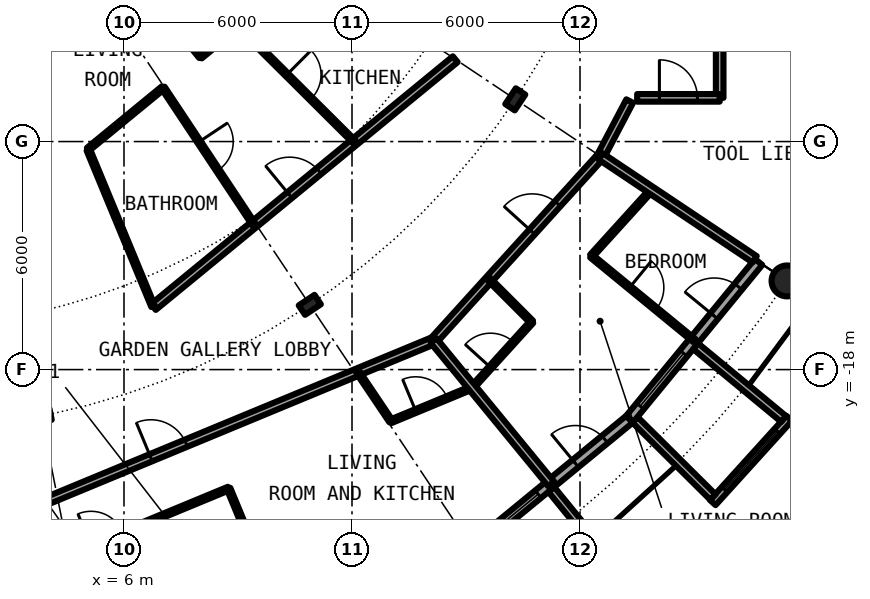
"""IFC4 building model, lengths in metres.
Left out: names, types, materials, properties, quantities, classifications, styles, units other than length and angle.
Written with IfcOpenShell. Run it as: python <this file> out.ifc"""

import sys

from ifc_helpers import new_model, si_unit, direction, frame, frame_2d, origin, origin_2d, place, context, subcontext, project, spatial, rectangle, circle, hollow_circle, i_section, extrude, element, fill, save


model = new_model("IFC4")
c1 = context("Model", 3, precision=1e-05, world=origin(), true_north=direction((0.0, 1.0)))
c2 = subcontext(c1, "Body", "Model", "MODEL_VIEW")
j1 = project(units=[si_unit("LENGTHUNIT", "METRE"), si_unit("PLANEANGLEUNIT", "RADIAN")], contexts=[c1])
p1 = place(None, origin())
s1 = spatial("IfcSite", under=j1, at=p1, CompositionType="ELEMENT")
p2 = place(p1, origin())
s2 = spatial("IfcBuilding", under=s1, at=p2, CompositionType="ELEMENT")
p3 = place(p2, frame((0.0, 0.0, 145.2)))
s3 = spatial("IfcBuildingStorey", under=s2, at=p3, CompositionType="ELEMENT", Elevation=145.2)
p4 = place(p3, frame((23.448, -15.667, 0.0), z_axis=(0.0, 0.0, 1.0), x_axis=(1.0, 0.0, 0.0)))
e1 = element("IfcColumn", 1, at=p4, inside=s3, PredefinedType="COLUMN", context=c2, shape_type="SweptSolid", body=[
    extrude(hollow_circle(Radius=0.406, WallThickness=0.04, at=origin_2d()), origin(), (0.0, 0.0, 1.0), 3.05),
])
for number, where, z_axis, x_axis in (
    (2, (10.889, -16.297, 0.0), (0.0, 0.0, 1.0), (0.556, -0.831, 0.0)),
    (3, (16.297, -10.889, 0.0), (0.0, 0.0, 1.0), (0.831, -0.556, 0.0)),
):
    element("IfcColumn", number, at=place(p3, frame(where, z_axis=z_axis, x_axis=x_axis)), inside=s3, PredefinedType="COLUMN", context=c2, shape_type="SweptSolid", body=[
        extrude(i_section(OverallWidth=0.3, OverallDepth=0.5, WebThickness=0.014, FlangeThickness=0.028, FilletRadius=0.027, at=origin_2d()), origin(), (0.0, 0.0, 1.0), 3.05),
    ])
p5 = place(p3, frame((15.167, -22.699, 0.0), z_axis=(0.0, 0.0, 1.0), x_axis=(0.773019449054, 0.634382322723, 0.0)))
e4 = element("IfcWall", 4, at=p5, inside=s3, PredefinedType="SOLIDWALL", context=c2, shape_type="SweptSolid", body=[
    extrude(rectangle(XDim=5.352, YDim=0.25, at=frame_2d((2.676, 0.0))), origin(), (0.0, 0.0, 1.0), 2.7),
])
p6 = place(p5, frame((0.441, 0.0, 0.3)))
e5 = element("IfcOpeningElement", 5, at=p6, cuts=e4, PredefinedType="OPENING", context=c2, shape_type="SweptSolid", body=[
    extrude(rectangle(XDim=1.8, YDim=2.1, at=frame_2d((0.9, 1.05))), frame((0.0, 0.135, 0.0), z_axis=(0.0, -1.0, 0.0), x_axis=(1.0, 0.0, 0.0)), (0.0, 0.0, 1.0), 0.27),
])
p7 = place(p5, frame((3.51, 0.0, 0.0)))
e6 = element("IfcOpeningElement", 6, at=p7, cuts=e4, PredefinedType="OPENING", context=c2, shape_type="SweptSolid", body=[
    extrude(rectangle(XDim=1.0, YDim=2.2, at=frame_2d((0.5, 1.1))), frame((0.0, 0.135, 0.0), z_axis=(0.0, -1.0, 0.0), x_axis=(1.0, 0.0, 0.0)), (0.0, 0.0, 1.0), 0.27),
])
p8 = place(p3, frame((17.246, -21.155, -0.03), z_axis=(0.0, 0.0, 1.0), x_axis=(0.631741648902, -0.775179004516, 0.0)))
e7 = element("IfcWall", 7, at=p8, inside=s3, PredefinedType="SOLIDWALL", context=c2, shape_type="SweptSolid", body=[
    extrude(rectangle(XDim=3.006, YDim=0.2, at=frame_2d((1.503, 0.0))), origin(), (0.0, 0.0, 1.0), 2.73),
])
p9 = place(p3, frame((19.304, -19.304, 0.0), z_axis=(0.0, 0.0, 1.0), x_axis=(0.634382322723, 0.773019449054, 0.0)))
e8 = element("IfcWall", 8, at=p9, inside=s3, PredefinedType="SOLIDWALL", context=c2, shape_type="SweptSolid", body=[
    extrude(rectangle(XDim=5.352, YDim=0.25, at=frame_2d((2.676, 0.0))), origin(), (0.0, 0.0, 1.0), 2.7),
])
p10 = place(p9, frame((0.441, 0.0, 0.3)))
e9 = element("IfcOpeningElement", 9, at=p10, cuts=e8, PredefinedType="OPENING", context=c2, shape_type="SweptSolid", body=[
    extrude(rectangle(XDim=1.8, YDim=2.1, at=frame_2d((0.9, 1.05))), frame((0.0, 0.135, 0.0), z_axis=(0.0, -1.0, 0.0), x_axis=(1.0, 0.0, 0.0)), (0.0, 0.0, 1.0), 0.27),
])
p11 = place(p9, frame((3.51, 0.0, 0.0)))
e10 = element("IfcOpeningElement", 10, at=p11, cuts=e8, PredefinedType="OPENING", context=c2, shape_type="SweptSolid", body=[
    extrude(rectangle(XDim=1.0, YDim=2.2, at=frame_2d((0.5, 1.1))), frame((0.0, 0.135, 0.0), z_axis=(0.0, -1.0, 0.0), x_axis=(1.0, 0.0, 0.0)), (0.0, 0.0, 1.0), 0.27),
])
p12 = place(p3, frame((21.493, -21.5, -0.03), z_axis=(0.0, 0.0, 1.0), x_axis=(0.671506829416, 0.740998365753, 0.0)))
e11 = element("IfcWall", 11, at=p12, inside=s3, PredefinedType="SOLIDWALL", context=c2, shape_type="SweptSolid", body=[
    extrude(rectangle(XDim=2.993, YDim=0.2, at=frame_2d((1.497, 0.0))), origin(), (0.0, 0.0, 1.0), 2.73),
])
p13 = place(p12, frame((0.457, 0.0, 0.33)))
e12 = element("IfcOpeningElement", 12, at=p13, cuts=e11, PredefinedType="OPENING", context=c2, shape_type="SweptSolid", body=[
    extrude(circle(Radius=1.04, at=frame_2d((1.04, 1.04))), frame((0.0, 0.11, 0.0), z_axis=(0.0, -1.0, 0.0), x_axis=(1.0, 0.0, 0.0)), (0.0, 0.0, 1.0), 0.22),
])
p14 = place(p3, frame((19.45, -19.323, -0.03), z_axis=(0.0, 0.0, 1.0), x_axis=(0.709727076896, -0.704476739375, 0.0)))
e13 = element("IfcWall", 13, at=p14, inside=s3, PredefinedType="SOLIDWALL", context=c2, shape_type="SweptSolid", body=[
    extrude(rectangle(XDim=2.883, YDim=0.2, at=frame_2d((1.441, 0.0))), origin(), (0.0, 0.0, 1.0), 2.73),
])
p15 = place(p3, frame((21.041, -17.384, -0.03), z_axis=(0.0, 0.0, 1.0), x_axis=(0.770784861449, -0.63709551667, 0.0)))
e14 = element("IfcWall", 14, at=p15, inside=s3, PredefinedType="SOLIDWALL", context=c2, shape_type="SweptSolid", body=[
    extrude(rectangle(XDim=3.006, YDim=0.2, at=frame_2d((1.503, 0.0))), origin(), (0.0, 0.0, 1.0), 2.73),
])
p16 = place(p3, frame((15.162, -18.475, 0.0), z_axis=(0.0, 0.0, 1.0), x_axis=(0.671528384412, 0.740978831634, 0.0)))
e15 = element("IfcWall", 15, at=p16, inside=s3, PredefinedType="PARTITIONING", context=c2, shape_type="SweptSolid", body=[
    extrude(rectangle(XDim=2.338, YDim=0.1, at=frame_2d((1.169, 0.0))), origin(), (0.0, 0.0, 1.0), 2.7),
])
p17 = place(p16, frame((0.719, 0.0, 0.0)))
e16 = element("IfcOpeningElement", 16, at=p17, cuts=e15, PredefinedType="OPENING", context=c2, shape_type="SweptSolid", body=[
    extrude(rectangle(XDim=0.9, YDim=2.3, at=frame_2d((0.45, 1.15))), frame((0.0, 0.06, 0.0), z_axis=(0.0, -1.0, 0.0), x_axis=(1.0, 0.0, 0.0)), (0.0, 0.0, 1.0), 0.12),
])
p18 = place(p3, frame((18.302, -15.01, 0.0), z_axis=(0.0, 0.0, 1.0), x_axis=(0.671637685376, 0.740879760544, 0.0)))
e17 = element("IfcWall", 17, at=p18, inside=s3, PredefinedType="PARTITIONING", context=c2, shape_type="SweptSolid", body=[
    extrude(rectangle(XDim=2.338, YDim=0.1, at=frame_2d((1.169, 0.0))), origin(), (0.0, 0.0, 1.0), 2.7),
])
p19 = place(p3, frame((2.342, -23.785, 0.0), z_axis=(0.0, 0.0, 1.0), x_axis=(0.92388173557, 0.382678113667, 0.0)))
e18 = element("IfcWall", 18, at=p19, inside=s3, PredefinedType="PARTITIONING", context=c2, shape_type="SweptSolid", body=[
    extrude(rectangle(XDim=6.938, YDim=0.1, at=frame_2d((3.469, 0.0))), origin(), (0.0, 0.0, 1.0), 2.7),
])
p20 = place(p19, frame((3.021, 0.0, 0.0)))
e19 = element("IfcOpeningElement", 19, at=p20, cuts=e18, PredefinedType="OPENING", context=c2, shape_type="SweptSolid", body=[
    extrude(rectangle(XDim=0.9, YDim=2.3, at=frame_2d((0.45, 1.15))), frame((0.0, 0.06, 0.0), z_axis=(0.0, -1.0, 0.0), x_axis=(1.0, 0.0, 0.0)), (0.0, 0.0, 1.0), 0.12),
])
p21 = place(p19, frame((0.707, 0.0, 0.0)))
e20 = element("IfcOpeningElement", 20, at=p21, cuts=e18, PredefinedType="OPENING", context=c2, shape_type="SweptSolid", body=[
    extrude(rectangle(XDim=0.9, YDim=2.3, at=frame_2d((0.45, 1.15))), frame((0.0, 0.06, 0.0), z_axis=(0.0, -1.0, 0.0), x_axis=(1.0, 0.0, 0.0)), (0.0, 0.0, 1.0), 0.12),
])
p22 = place(p3, frame((13.028, -19.359, 0.0), z_axis=(0.0, 0.0, 1.0), x_axis=(0.92369108554, 0.383138067142, 0.0)))
e21 = element("IfcWall", 21, at=p22, inside=s3, PredefinedType="PARTITIONING", context=c2, shape_type="SweptSolid", body=[
    extrude(rectangle(XDim=2.312, YDim=0.1, at=frame_2d((1.156, 0.0))), origin(), (0.0, 0.0, 1.0), 2.7),
])
p23 = place(p22, frame((0.703, 0.0, 0.0)))
e22 = element("IfcOpeningElement", 22, at=p23, cuts=e21, PredefinedType="OPENING", context=c2, shape_type="SweptSolid", body=[
    extrude(rectangle(XDim=0.9, YDim=2.3, at=frame_2d((0.45, 1.15))), frame((0.0, 0.06, 0.0), z_axis=(0.0, -1.0, 0.0), x_axis=(1.0, 0.0, 0.0)), (0.0, 0.0, 1.0), 0.12),
])
p24 = place(p3, frame((18.542, -12.389, 0.0), z_axis=(0.0, 0.0, 1.0), x_axis=(0.465605550524, 0.884992356646, 0.0)))
e23 = element("IfcWall", 23, at=p24, inside=s3, PredefinedType="PARTITIONING", context=c2, shape_type="SweptSolid", body=[
    extrude(rectangle(XDim=1.643, YDim=0.2, at=frame_2d((0.821, 0.0))), origin(), (0.0, 0.0, 1.0), 2.7),
])
p25 = place(p3, frame((14.147, -17.238, 0.0), z_axis=(0.0, 0.0, 1.0), x_axis=(0.671561669125, 0.740948665268, 0.0)))
e24 = element("IfcWall", 24, at=p25, inside=s3, PredefinedType="PARTITIONING", context=c2, shape_type="SweptSolid", body=[
    extrude(rectangle(XDim=6.544, YDim=0.2, at=frame_2d((3.272, 0.0))), origin(), (0.0, 0.0, 1.0), 2.7),
])
p26 = place(p25, frame((3.862, 0.0, 0.0)))
e25 = element("IfcOpeningElement", 25, at=p26, cuts=e24, PredefinedType="OPENING", context=c2, shape_type="SweptSolid", body=[
    extrude(rectangle(XDim=1.0, YDim=2.3, at=frame_2d((0.5, 1.15))), frame((0.0, 0.11, 0.0), z_axis=(0.0, -1.0, 0.0), x_axis=(1.0, 0.0, 0.0)), (0.0, 0.0, 1.0), 0.22),
])
p27 = place(p3, frame((21.675, -10.85, 0.0), z_axis=(0.0, 0.0, 1.0), x_axis=(0.0, 1.0, 0.0)))
e26 = element("IfcWall", 26, at=p27, inside=s3, PredefinedType="PARTITIONING", context=c2, shape_type="SweptSolid", body=[
    extrude(rectangle(XDim=1.75, YDim=0.2, at=frame_2d((0.875, 0.0))), origin(), (0.0, 0.0, 1.0), 2.7),
])
p28 = place(p3, frame((2.186, -22.193, 0.0), z_axis=(0.0, 0.0, 1.0), x_axis=(0.923860535822, 0.382729291212, 0.0)))
e27 = element("IfcWall", 27, at=p28, inside=s3, PredefinedType="PARTITIONING", context=c2, shape_type="SweptSolid", body=[
    extrude(rectangle(XDim=12.947, YDim=0.2, at=frame_2d((6.473, 0.0))), origin(), (0.0, 0.0, 1.0), 2.7),
])
p29 = place(p28, frame((4.894, 0.0, 0.0)))
e28 = element("IfcOpeningElement", 28, at=p29, cuts=e27, PredefinedType="OPENING", context=c2, shape_type="SweptSolid", body=[
    extrude(rectangle(XDim=1.0, YDim=2.3, at=frame_2d((0.5, 1.15))), frame((0.0, 0.11, 0.0), z_axis=(0.0, -1.0, 0.0), x_axis=(1.0, 0.0, 0.0)), (0.0, 0.0, 1.0), 0.22),
])
p30 = place(p3, frame((6.773, -16.353, 0.0), z_axis=(0.0, 0.0, 1.0), x_axis=(0.773034536097, 0.634363938131, 0.0)))
e29 = element("IfcWall", 29, at=p30, inside=s3, PredefinedType="PARTITIONING", context=c2, shape_type="SweptSolid", body=[
    extrude(rectangle(XDim=10.277, YDim=0.2, at=frame_2d((5.138, 0.0))), origin(), (0.0, 0.0, 1.0), 2.7),
])
p31 = place(p30, frame((4.638, 0.0, 0.0)))
e30 = element("IfcOpeningElement", 30, at=p31, cuts=e29, PredefinedType="OPENING", context=c2, shape_type="SweptSolid", body=[
    extrude(rectangle(XDim=1.0, YDim=2.3, at=frame_2d((0.5, 1.15))), frame((0.0, 0.11, 0.0), z_axis=(0.0, -1.0, 0.0), x_axis=(1.0, 0.0, 0.0)), (0.0, 0.0, 1.0), 0.22),
])
p32 = place(p3, frame((5.055, -12.204, 0.0), z_axis=(0.0, 0.0, 1.0), x_axis=(0.772943675046, 0.634474645046, 0.0)))
e31 = element("IfcWall", 31, at=p32, inside=s3, PredefinedType="PARTITIONING", context=c2, shape_type="SweptSolid", body=[
    extrude(rectangle(XDim=2.557, YDim=0.1, at=frame_2d((1.278, 0.0))), origin(), (0.0, 0.0, 1.0), 2.7),
])
p33 = place(p3, frame((8.016, -9.773, 0.0), z_axis=(0.0, 0.0, 1.0), x_axis=(0.7731800648, 0.634186555673, 0.0)))
e32 = element("IfcWall", 32, at=p33, inside=s3, PredefinedType="PARTITIONING", context=c2, shape_type="SweptSolid", body=[
    extrude(rectangle(XDim=1.064, YDim=0.1, at=frame_2d((0.532, 0.0))), origin(), (0.0, 0.0, 1.0), 2.7),
])
p34 = place(p3, frame((19.504, -10.85, 0.0), z_axis=(0.0, 0.0, 1.0), x_axis=(1.0, 0.0, 0.0)))
e33 = element("IfcWall", 33, at=p34, inside=s3, PredefinedType="PARTITIONING", context=c2, shape_type="SweptSolid", body=[
    extrude(rectangle(XDim=2.171, YDim=0.2, at=frame_2d((1.085, 0.0))), origin(), (0.0, 0.0, 1.0), 2.7),
])
p35 = place(p34, frame((0.585, 0.0, 0.0)))
e34 = element("IfcOpeningElement", 34, at=p35, cuts=e33, PredefinedType="OPENING", context=c2, shape_type="SweptSolid", body=[
    extrude(rectangle(XDim=1.0, YDim=2.3, at=frame_2d((0.5, 1.15))), frame((0.0, 0.11, 0.0), z_axis=(0.0, -1.0, 0.0), x_axis=(1.0, 0.0, 0.0)), (0.0, 0.0, 1.0), 0.22),
])
p36 = place(p3, frame((4.898, -5.968, 0.0), z_axis=(0.0, 0.0, 1.0), x_axis=(0.634401778971, -0.773003481776, 0.0)))
e35 = element("IfcWall", 35, at=p36, inside=s3, PredefinedType="PARTITIONING", context=c2, shape_type="SweptSolid", body=[
    extrude(rectangle(XDim=4.92, YDim=0.1, at=frame_2d((2.46, 0.0))), origin(), (0.0, 0.0, 1.0), 2.7),
])
p37 = place(p36, frame((2.01, 0.0, 0.0)))
e36 = element("IfcOpeningElement", 36, at=p37, cuts=e35, PredefinedType="OPENING", context=c2, shape_type="SweptSolid", body=[
    extrude(rectangle(XDim=0.9, YDim=2.3, at=frame_2d((0.45, 1.15))), frame((0.0, 0.06, 0.0), z_axis=(0.0, -1.0, 0.0), x_axis=(1.0, 0.0, 0.0)), (0.0, 0.0, 1.0), 0.12),
])
p38 = place(p3, frame((7.028, -10.584, 0.0), z_axis=(0.0, 0.0, 1.0), x_axis=(0.553303732327, -0.832979579457, 0.0)))
e37 = element("IfcWall", 37, at=p38, inside=s3, PredefinedType="PARTITIONING", context=c2, shape_type="SweptSolid", body=[
    extrude(rectangle(XDim=4.319, YDim=0.1, at=frame_2d((2.16, 0.0))), origin(), (0.0, 0.0, 1.0), 2.7),
])
p39 = place(p38, frame((1.71, 0.0, 0.0)))
e38 = element("IfcOpeningElement", 38, at=p39, cuts=e37, PredefinedType="OPENING", context=c2, shape_type="SweptSolid", body=[
    extrude(rectangle(XDim=0.9, YDim=2.3, at=frame_2d((0.45, 1.15))), frame((0.0, 0.06, 0.0), z_axis=(0.0, -1.0, 0.0), x_axis=(1.0, 0.0, 0.0)), (0.0, 0.0, 1.0), 0.12),
])
p40 = place(p3, frame((8.752, -21.13, 0.0), z_axis=(0.0, 0.0, 1.0), x_axis=(0.382689142274, -0.923877167369, 0.0)))
e39 = element("IfcWall", 39, at=p40, inside=s3, PredefinedType="PARTITIONING", context=c2, shape_type="SweptSolid", body=[
    extrude(rectangle(XDim=4.304, YDim=0.1, at=frame_2d((2.152, 0.0))), origin(), (0.0, 0.0, 1.0), 2.7),
])
p41 = place(p40, frame((1.702, 0.0, 0.0)))
e40 = element("IfcOpeningElement", 40, at=p41, cuts=e39, PredefinedType="OPENING", context=c2, shape_type="SweptSolid", body=[
    extrude(rectangle(XDim=0.9, YDim=2.3, at=frame_2d((0.45, 1.15))), frame((0.0, 0.06, 0.0), z_axis=(0.0, -1.0, 0.0), x_axis=(1.0, 0.0, 0.0)), (0.0, 0.0, 1.0), 0.12),
])
p42 = place(p3, frame((9.144, -9.104, 0.0), z_axis=(0.0, 0.0, 1.0), x_axis=(0.708793214553, -0.705416316088, 0.0)))
e41 = element("IfcWall", 41, at=p42, inside=s3, PredefinedType="PARTITIONING", context=c2, shape_type="SweptSolid", body=[
    extrude(rectangle(XDim=4.121, YDim=0.1, at=frame_2d((2.061, 0.0))), origin(), (0.0, 0.0, 1.0), 2.7),
])
p43 = place(p42, frame((1.611, 0.0, 0.0)))
e42 = element("IfcOpeningElement", 42, at=p43, cuts=e41, PredefinedType="OPENING", context=c2, shape_type="SweptSolid", body=[
    extrude(rectangle(XDim=0.9, YDim=2.3, at=frame_2d((0.45, 1.15))), frame((0.0, 0.06, 0.0), z_axis=(0.0, -1.0, 0.0), x_axis=(1.0, 0.0, 0.0)), (0.0, 0.0, 1.0), 0.12),
])
p44 = place(p3, frame((12.153, -18.064, 0.0), z_axis=(0.0, 0.0, 1.0), x_axis=(0.558121913892, -0.829758958514, 0.0)))
e43 = element("IfcWall", 43, at=p44, inside=s3, PredefinedType="PARTITIONING", context=c2, shape_type="SweptSolid", body=[
    extrude(rectangle(XDim=1.562, YDim=0.1, at=frame_2d((0.781, 0.0))), origin(), (0.0, 0.0, 1.0), 2.7),
])
p45 = place(p3, frame((14.147, -17.238, 0.0), z_axis=(0.0, 0.0, 1.0), x_axis=(0.634374159378, -0.773026148273, 0.0)))
e44 = element("IfcWall", 44, at=p45, inside=s3, PredefinedType="PARTITIONING", context=c2, shape_type="SweptSolid", body=[
    extrude(rectangle(XDim=4.876, YDim=0.2, at=frame_2d((2.438, 0.0))), origin(), (0.0, 0.0, 1.0), 2.7),
])
p46 = place(p3, frame((15.608, -15.626, 0.0), z_axis=(0.0, 0.0, 1.0), x_axis=(0.70679860656, -0.707414821561, 0.0)))
e45 = element("IfcWall", 45, at=p46, inside=s3, PredefinedType="PARTITIONING", context=c2, shape_type="SweptSolid", body=[
    extrude(rectangle(XDim=1.585, YDim=0.1, at=frame_2d((0.792, 0.0))), origin(), (0.0, 0.0, 1.0), 2.7),
])
p47 = place(p3, frame((18.299, -15.014, 0.0), z_axis=(0.0, 0.0, 1.0), x_axis=(0.773131168403, -0.634246163917, 0.0)))
e46 = element("IfcWall", 46, at=p47, inside=s3, PredefinedType="PARTITIONING", context=c2, shape_type="SweptSolid", body=[
    extrude(rectangle(XDim=3.505, YDim=0.1, at=frame_2d((1.752, 0.0))), origin(), (0.0, 0.0, 1.0), 2.7),
])
p48 = place(p47, frame((1.302, 0.0, 0.0)))
e47 = element("IfcOpeningElement", 47, at=p48, cuts=e46, PredefinedType="OPENING", context=c2, shape_type="SweptSolid", body=[
    extrude(rectangle(XDim=0.9, YDim=2.3, at=frame_2d((0.45, 1.15))), frame((0.0, 0.06, 0.0), z_axis=(0.0, -1.0, 0.0), x_axis=(1.0, 0.0, 0.0)), (0.0, 0.0, 1.0), 0.12),
])
p49 = place(p3, frame((18.542, -12.389, 0.0), z_axis=(0.0, 0.0, 1.0), x_axis=(0.831387096605, -0.55569370664, 0.0)))
e48 = element("IfcWall", 48, at=p49, inside=s3, PredefinedType="PARTITIONING", context=c2, shape_type="SweptSolid", body=[
    extrude(rectangle(XDim=4.875, YDim=0.2, at=frame_2d((2.438, 0.0))), origin(), (0.0, 0.0, 1.0), 2.7),
])
p50 = place(p3, frame((6.765, -16.334, 0.0), z_axis=(0.0, 0.0, 1.0), x_axis=(-0.382498794932, 0.923955990226, 0.0)))
e49 = element("IfcWall", 49, at=p50, inside=s3, PredefinedType="PARTITIONING", context=c2, shape_type="SweptSolid", body=[
    extrude(rectangle(XDim=4.449, YDim=0.1, at=frame_2d((2.225, 0.0))), origin(), (0.0, 0.0, 1.0), 2.7),
])
p51 = place(p6, origin())
e50 = element("IfcWindow", 50, at=p51, inside=s3, PartitioningType="SINGLE_PANEL", PredefinedType="WINDOW", context=c2, shape_type="SweptSolid", body=[
    extrude(rectangle(XDim=1.8, YDim=2.1, at=frame_2d((0.9, 1.05))), frame((0.0, 0.03, 0.0), z_axis=(0.0, -1.0, 0.0), x_axis=(1.0, 0.0, 0.0)), (0.0, 0.0, 1.0), 0.06),
])
fill(e5, e50)
p52 = place(p7, origin())
e51 = element("IfcDoor", 51, at=p52, inside=s3, OperationType="SINGLE_SWING_LEFT", PredefinedType="DOOR", context=c2, shape_type="SweptSolid", body=[
    extrude(rectangle(XDim=1.0, YDim=2.2, at=frame_2d((0.5, 1.1))), frame((0.0, 0.025, 0.0), z_axis=(0.0, -1.0, 0.0), x_axis=(1.0, 0.0, 0.0)), (0.0, 0.0, 1.0), 0.05),
])
fill(e6, e51)
p53 = place(p10, origin())
e52 = element("IfcWindow", 52, at=p53, inside=s3, PartitioningType="SINGLE_PANEL", PredefinedType="WINDOW", context=c2, shape_type="SweptSolid", body=[
    extrude(rectangle(XDim=1.8, YDim=2.1, at=frame_2d((0.9, 1.05))), frame((0.0, 0.03, 0.0), z_axis=(0.0, -1.0, 0.0), x_axis=(1.0, 0.0, 0.0)), (0.0, 0.0, 1.0), 0.06),
])
fill(e9, e52)
p54 = place(p13, origin())
e53 = element("IfcWindow", 53, at=p54, inside=s3, PartitioningType="SINGLE_PANEL", PredefinedType="WINDOW", context=c2, shape_type="SweptSolid", body=[
    extrude(circle(Radius=1.04, at=frame_2d((1.04, 1.04))), frame((0.0, 0.03, 0.0), z_axis=(0.0, -1.0, 0.0), x_axis=(1.0, 0.0, 0.0)), (0.0, 0.0, 1.0), 0.06),
])
fill(e12, e53)
p55 = place(p11, origin())
e54 = element("IfcDoor", 54, at=p55, inside=s3, OperationType="SINGLE_SWING_LEFT", PredefinedType="DOOR", context=c2, shape_type="SweptSolid", body=[
    extrude(rectangle(XDim=1.0, YDim=2.2, at=frame_2d((0.5, 1.1))), frame((0.0, 0.025, 0.0), z_axis=(0.0, -1.0, 0.0), x_axis=(1.0, 0.0, 0.0)), (0.0, 0.0, 1.0), 0.05),
])
fill(e10, e54)
p56 = place(p29, origin())
e55 = element("IfcDoor", 55, at=p56, inside=s3, OperationType="SINGLE_SWING_LEFT", PredefinedType="DOOR", context=c2, shape_type="SweptSolid", body=[
    extrude(rectangle(XDim=1.0, YDim=2.3, at=frame_2d((0.5, 1.15))), frame((0.0, 0.025, 0.0), z_axis=(0.0, -1.0, 0.0), x_axis=(1.0, 0.0, 0.0)), (0.0, 0.0, 1.0), 0.05),
])
fill(e28, e55)
p57 = place(p23, origin())
e56 = element("IfcDoor", 56, at=p57, inside=s3, OperationType="SINGLE_SWING_LEFT", PredefinedType="DOOR", context=c2, shape_type="SweptSolid", body=[
    extrude(rectangle(XDim=0.9, YDim=2.3, at=frame_2d((0.45, 1.15))), frame((0.0, 0.025, 0.0), z_axis=(0.0, -1.0, 0.0), x_axis=(1.0, 0.0, 0.0)), (0.0, 0.0, 1.0), 0.05),
])
fill(e22, e56)
p58 = place(p26, origin())
e57 = element("IfcDoor", 57, at=p58, inside=s3, OperationType="SINGLE_SWING_RIGHT", PredefinedType="DOOR", context=c2, shape_type="SweptSolid", body=[
    extrude(rectangle(XDim=1.0, YDim=2.3, at=frame_2d((0.5, 1.15))), frame((0.0, 0.025, 0.0), z_axis=(0.0, -1.0, 0.0), x_axis=(1.0, 0.0, 0.0)), (0.0, 0.0, 1.0), 0.05),
])
fill(e25, e57)
p59 = place(p17, origin())
e58 = element("IfcDoor", 58, at=p59, inside=s3, OperationType="SINGLE_SWING_LEFT", PredefinedType="DOOR", context=c2, shape_type="SweptSolid", body=[
    extrude(rectangle(XDim=0.9, YDim=2.3, at=frame_2d((0.45, 1.15))), frame((0.0, 0.025, 0.0), z_axis=(0.0, -1.0, 0.0), x_axis=(1.0, 0.0, 0.0)), (0.0, 0.0, 1.0), 0.05),
])
fill(e16, e58)
p60 = place(p48, origin())
e59 = element("IfcDoor", 59, at=p60, inside=s3, OperationType="SINGLE_SWING_LEFT", PredefinedType="DOOR", context=c2, shape_type="SweptSolid", body=[
    extrude(rectangle(XDim=0.9, YDim=2.3, at=frame_2d((0.45, 1.15))), frame((0.0, 0.025, 0.0), z_axis=(0.0, -1.0, 0.0), x_axis=(1.0, 0.0, 0.0)), (0.0, 0.0, 1.0), 0.05),
])
fill(e47, e59)
p61 = place(p31, origin())
e60 = element("IfcDoor", 60, at=p61, inside=s3, OperationType="SINGLE_SWING_RIGHT", PredefinedType="DOOR", context=c2, shape_type="SweptSolid", body=[
    extrude(rectangle(XDim=1.0, YDim=2.3, at=frame_2d((0.5, 1.15))), frame((0.0, 0.025, 0.0), z_axis=(0.0, -1.0, 0.0), x_axis=(1.0, 0.0, 0.0)), (0.0, 0.0, 1.0), 0.05),
])
fill(e30, e60)
p62 = place(p39, origin())
e61 = element("IfcDoor", 61, at=p62, inside=s3, OperationType="SINGLE_SWING_LEFT", PredefinedType="DOOR", context=c2, shape_type="SweptSolid", body=[
    extrude(rectangle(XDim=0.9, YDim=2.3, at=frame_2d((0.45, 1.15))), frame((0.0, 0.025, 0.0), z_axis=(0.0, -1.0, 0.0), x_axis=(1.0, 0.0, 0.0)), (0.0, 0.0, 1.0), 0.05),
])
fill(e38, e61)
p63 = place(p43, origin())
e62 = element("IfcDoor", 62, at=p63, inside=s3, OperationType="SINGLE_SWING_RIGHT", PredefinedType="DOOR", context=c2, shape_type="SweptSolid", body=[
    extrude(rectangle(XDim=0.9, YDim=2.3, at=frame_2d((0.45, 1.15))), frame((0.0, 0.025, 0.0), z_axis=(0.0, -1.0, 0.0), x_axis=(1.0, 0.0, 0.0)), (0.0, 0.0, 1.0), 0.05),
])
fill(e42, e62)
p64 = place(p35, origin())
e63 = element("IfcDoor", 63, at=p64, inside=s3, OperationType="SINGLE_SWING_LEFT", PredefinedType="DOOR", context=c2, shape_type="SweptSolid", body=[
    extrude(rectangle(XDim=1.0, YDim=2.3, at=frame_2d((0.5, 1.15))), frame((0.0, 0.025, 0.0), z_axis=(0.0, -1.0, 0.0), x_axis=(1.0, 0.0, 0.0)), (0.0, 0.0, 1.0), 0.05),
])
fill(e34, e63)
save(model, sys.argv[1])
